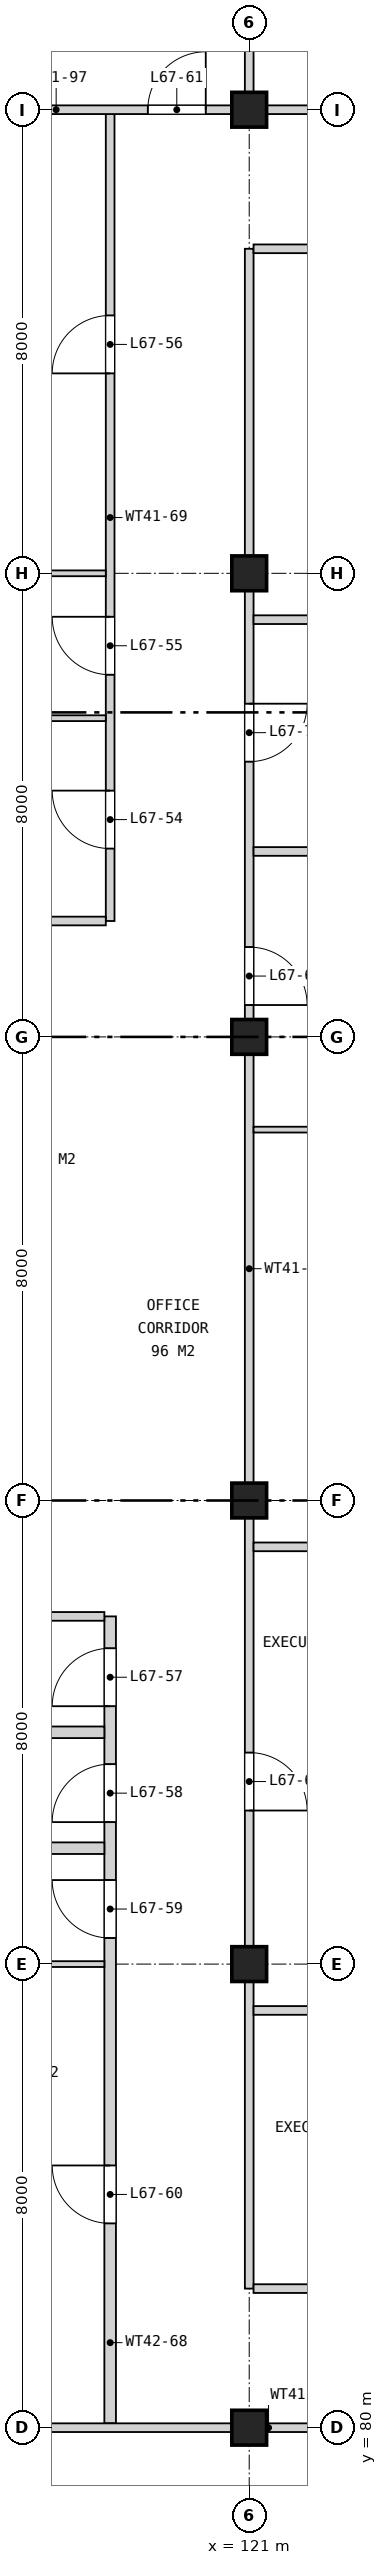
"""IFC4 building model, lengths in metres.
Left out: names, types, materials, properties, quantities, classifications, styles, units other than length and angle.
Written with IfcOpenShell. Run it as: python <this file> out.ifc"""

import sys

from ifc_helpers import new_model, si_unit, direction, frame, frame_2d, origin, origin_2d, place, context, subcontext, project, spatial, rectangle, extrude, element, fill, save


model = new_model("IFC4")
c1 = context("Model", 3, precision=1e-05, world=origin(), true_north=direction((0.0, 1.0)))
c2 = subcontext(c1, "Body", "Model", "MODEL_VIEW")
j1 = project(units=[si_unit("LENGTHUNIT", "METRE"), si_unit("PLANEANGLEUNIT", "RADIAN")], contexts=[c1])
p1 = place(None, origin())
s1 = spatial("IfcSite", under=j1, at=p1, CompositionType="ELEMENT")
p2 = place(p1, origin())
s2 = spatial("IfcBuilding", under=s1, at=p2, CompositionType="ELEMENT")
p3 = place(p2, frame((0.0, 0.0, 311.3)))
s3 = spatial("IfcBuildingStorey", under=s2, at=p3, CompositionType="ELEMENT", Elevation=311.3)
for number, where, z_axis, x_axis in (
    (1, (121.0, 80.0, 0.0), (0.0, 0.0, 1.0), (1.0, 0.0, 0.0)),
    (2, (121.0, 88.0, 0.0), (0.0, 0.0, 1.0), (1.0, 0.0, 0.0)),
    (3, (121.0, 96.0, 0.0), (0.0, 0.0, 1.0), (1.0, 0.0, 0.0)),
    (4, (121.0, 104.0, 0.0), (0.0, 0.0, 1.0), (1.0, 0.0, 0.0)),
    (5, (121.0, 112.0, 0.0), (0.0, 0.0, 1.0), (1.0, 0.0, 0.0)),
    (6, (121.0, 120.0, 0.0), (0.0, 0.0, 1.0), (1.0, 0.0, 0.0)),
):
    element("IfcColumn", number, at=place(p3, frame(where, z_axis=z_axis, x_axis=x_axis)), inside=s3, PredefinedType="COLUMN", context=c2, shape_type="SweptSolid", body=[
        extrude(rectangle(XDim=0.6, YDim=0.6, at=origin_2d()), origin(), (0.0, 0.0, 1.0), 4.2),
    ])
p4 = place(p3, frame((118.6, 80.075, 0.0), z_axis=(0.0, 0.0, 1.0), x_axis=(0.0, 1.0, 0.0)))
e7 = element("IfcWall", 7, at=p4, inside=s3, PredefinedType="SOLIDWALL", context=c2, shape_type="SweptSolid", body=[
    extrude(rectangle(XDim=13.925, YDim=0.2, at=frame_2d((6.962, 0.0))), origin(), (0.0, 0.0, 1.0), 3.443),
])
p5 = place(p4, frame((12.375, 0.0, 0.0)))
e8 = element("IfcOpeningElement", 8, at=p5, cuts=e7, PredefinedType="OPENING", context=c2, shape_type="SweptSolid", body=[
    extrude(rectangle(XDim=1.0, YDim=2.1, at=frame_2d((0.5, 1.05))), frame((0.0, 0.11, 0.0), z_axis=(0.0, -1.0, 0.0), x_axis=(1.0, 0.0, 0.0)), (0.0, 0.0, 1.0), 0.22),
])
p6 = place(p4, frame((10.375, 0.0, 0.0)))
e9 = element("IfcOpeningElement", 9, at=p6, cuts=e7, PredefinedType="OPENING", context=c2, shape_type="SweptSolid", body=[
    extrude(rectangle(XDim=1.0, YDim=2.1, at=frame_2d((0.5, 1.05))), frame((0.0, 0.11, 0.0), z_axis=(0.0, -1.0, 0.0), x_axis=(1.0, 0.0, 0.0)), (0.0, 0.0, 1.0), 0.22),
])
p7 = place(p4, frame((8.375, 0.0, 0.0)))
e10 = element("IfcOpeningElement", 10, at=p7, cuts=e7, PredefinedType="OPENING", context=c2, shape_type="SweptSolid", body=[
    extrude(rectangle(XDim=1.0, YDim=2.1, at=frame_2d((0.5, 1.05))), frame((0.0, 0.11, 0.0), z_axis=(0.0, -1.0, 0.0), x_axis=(1.0, 0.0, 0.0)), (0.0, 0.0, 1.0), 0.22),
])
p8 = place(p4, frame((3.45, 0.0, 0.0)))
e11 = element("IfcOpeningElement", 11, at=p8, cuts=e7, PredefinedType="OPENING", context=c2, shape_type="SweptSolid", body=[
    extrude(rectangle(XDim=1.0, YDim=2.1, at=frame_2d((0.5, 1.05))), frame((0.0, 0.11, 0.0), z_axis=(0.0, -1.0, 0.0), x_axis=(1.0, 0.0, 0.0)), (0.0, 0.0, 1.0), 0.22),
])
p9 = place(p3, frame((118.6, 106.0, 0.0), z_axis=(0.0, 0.0, 1.0), x_axis=(0.0, 1.0, 0.0)))
e12 = element("IfcWall", 12, at=p9, inside=s3, PredefinedType="PARTITIONING", context=c2, shape_type="SweptSolid", body=[
    extrude(rectangle(XDim=13.925, YDim=0.15, at=frame_2d((6.962, 0.0))), origin(), (0.0, 0.0, 1.0), 3.443),
])
p10 = place(p9, frame((1.25, 0.0, 0.0)))
e13 = element("IfcOpeningElement", 13, at=p10, cuts=e12, PredefinedType="OPENING", context=c2, shape_type="SweptSolid", body=[
    extrude(rectangle(XDim=1.0, YDim=2.1, at=frame_2d((0.5, 1.05))), frame((0.0, 0.085, 0.0), z_axis=(0.0, -1.0, 0.0), x_axis=(1.0, 0.0, 0.0)), (0.0, 0.0, 1.0), 0.17),
])
p11 = place(p9, frame((4.25, 0.0, 0.0)))
e14 = element("IfcOpeningElement", 14, at=p11, cuts=e12, PredefinedType="OPENING", context=c2, shape_type="SweptSolid", body=[
    extrude(rectangle(XDim=1.0, YDim=2.1, at=frame_2d((0.5, 1.05))), frame((0.0, 0.085, 0.0), z_axis=(0.0, -1.0, 0.0), x_axis=(1.0, 0.0, 0.0)), (0.0, 0.0, 1.0), 0.17),
])
p12 = place(p9, frame((9.45, 0.0, 0.0)))
e15 = element("IfcOpeningElement", 15, at=p12, cuts=e12, PredefinedType="OPENING", context=c2, shape_type="SweptSolid", body=[
    extrude(rectangle(XDim=1.0, YDim=2.1, at=frame_2d((0.5, 1.05))), frame((0.0, 0.085, 0.0), z_axis=(0.0, -1.0, 0.0), x_axis=(1.0, 0.0, 0.0)), (0.0, 0.0, 1.0), 0.17),
])
p13 = place(p3, frame((121.0, 82.4, 0.0), z_axis=(0.0, 0.0, 1.0), x_axis=(0.0, 1.0, 0.0)))
e16 = element("IfcWall", 16, at=p13, inside=s3, PredefinedType="PARTITIONING", context=c2, shape_type="SweptSolid", body=[
    extrude(rectangle(XDim=35.2, YDim=0.15, at=frame_2d((17.6, 0.0))), origin(), (0.0, 0.0, 1.0), 3.443),
])
p14 = place(p13, frame((8.25, 0.0, 0.0)))
e17 = element("IfcOpeningElement", 17, at=p14, cuts=e16, PredefinedType="OPENING", context=c2, shape_type="SweptSolid", body=[
    extrude(rectangle(XDim=1.0, YDim=2.1, at=frame_2d((0.5, 1.05))), frame((0.0, 0.085, 0.0), z_axis=(0.0, -1.0, 0.0), x_axis=(1.0, 0.0, 0.0)), (0.0, 0.0, 1.0), 0.17),
])
p15 = place(p13, frame((22.15, 0.0, 0.0)))
e18 = element("IfcOpeningElement", 18, at=p15, cuts=e16, PredefinedType="OPENING", context=c2, shape_type="SweptSolid", body=[
    extrude(rectangle(XDim=1.0, YDim=2.1, at=frame_2d((0.5, 1.05))), frame((0.0, 0.085, 0.0), z_axis=(0.0, -1.0, 0.0), x_axis=(1.0, 0.0, 0.0)), (0.0, 0.0, 1.0), 0.17),
])
p16 = place(p13, frame((26.35, 0.0, 0.0)))
e19 = element("IfcOpeningElement", 19, at=p16, cuts=e16, PredefinedType="OPENING", context=c2, shape_type="SweptSolid", body=[
    extrude(rectangle(XDim=1.0, YDim=2.1, at=frame_2d((0.5, 1.05))), frame((0.0, 0.085, 0.0), z_axis=(0.0, -1.0, 0.0), x_axis=(1.0, 0.0, 0.0)), (0.0, 0.0, 1.0), 0.17),
])
p17 = place(p3, frame((121.0, 120.075, 0.0), z_axis=(0.0, 0.0, 1.0), x_axis=(0.0, 1.0, 0.0)))
e20 = element("IfcWall", 20, at=p17, inside=s3, PredefinedType="PARTITIONING", context=c2, shape_type="SweptSolid", body=[
    extrude(rectangle(XDim=8.145, YDim=0.15, at=frame_2d((4.073, 0.0))), origin(), (0.0, 0.0, 1.0), 3.443),
])
p18 = place(p3, frame((112.78, 80.0, 0.0), z_axis=(0.0, 0.0, 1.0), x_axis=(1.0, 0.0, 0.0)))
e21 = element("IfcWall", 21, at=p18, inside=s3, PredefinedType="PARTITIONING", context=c2, shape_type="SweptSolid", body=[
    extrude(rectangle(XDim=24.44, YDim=0.15, at=frame_2d((12.22, 0.0))), origin(), (0.0, 0.0, 1.0), 3.443),
])
p19 = place(p18, frame((11.27, 0.0, 0.0)))
e22 = element("IfcOpeningElement", 22, at=p19, cuts=e21, PredefinedType="OPENING", context=c2, shape_type="SweptSolid", body=[
    extrude(rectangle(XDim=1.8, YDim=2.1, at=frame_2d((0.9, 1.05))), frame((0.0, 0.085, 0.0), z_axis=(0.0, -1.0, 0.0), x_axis=(1.0, 0.0, 0.0)), (0.0, 0.0, 1.0), 0.17),
])
p20 = place(p3, frame((121.075, 82.4, 0.0), z_axis=(0.0, 0.0, 1.0), x_axis=(1.0, 0.0, 0.0)))
e23 = element("IfcWall", 23, at=p20, inside=s3, PredefinedType="PARTITIONING", context=c2, shape_type="SweptSolid", body=[
    extrude(rectangle(XDim=7.85, YDim=0.15, at=frame_2d((3.925, 0.0))), origin(), (0.0, 0.0, 1.0), 3.443),
])
p21 = place(p20, frame((3.45, 0.0, 0.0)))
e24 = element("IfcOpeningElement", 24, at=p21, cuts=e23, PredefinedType="OPENING", context=c2, shape_type="SweptSolid", body=[
    extrude(rectangle(XDim=1.0, YDim=2.1, at=frame_2d((0.5, 1.05))), frame((0.0, 0.085, 0.0), z_axis=(0.0, -1.0, 0.0), x_axis=(1.0, 0.0, 0.0)), (0.0, 0.0, 1.0), 0.17),
])
p22 = place(p3, frame((121.075, 87.2, 0.0), z_axis=(0.0, 0.0, 1.0), x_axis=(1.0, 0.0, 0.0)))
e25 = element("IfcWall", 25, at=p22, inside=s3, PredefinedType="PARTITIONING", context=c2, shape_type="SweptSolid", body=[
    extrude(rectangle(XDim=7.85, YDim=0.15, at=frame_2d((3.925, 0.0))), origin(), (0.0, 0.0, 1.0), 3.443),
])
p23 = place(p3, frame((113.0, 88.0, 0.0), z_axis=(0.0, 0.0, 1.0), x_axis=(1.0, 0.0, 0.0)))
e26 = element("IfcWall", 26, at=p23, inside=s3, PredefinedType="PARTITIONING", context=c2, shape_type="SweptSolid", body=[
    extrude(rectangle(XDim=5.5, YDim=0.1, at=frame_2d((2.75, 0.0))), origin(), (0.0, 0.0, 1.0), 3.443),
])
for number, where, z_axis, x_axis in (
    (27, (113.0, 90.0, 0.0), (0.0, 0.0, 1.0), (1.0, 0.0, 0.0)),
    (28, (113.0, 92.0, 0.0), (0.0, 0.0, 1.0), (1.0, 0.0, 0.0)),
):
    element("IfcWall", number, at=place(p3, frame(where, z_axis=z_axis, x_axis=x_axis)), inside=s3, PredefinedType="SOLIDWALL", context=c2, shape_type="SweptSolid", body=[
        extrude(rectangle(XDim=5.5, YDim=0.2, at=frame_2d((2.75, 0.0))), origin(), (0.0, 0.0, 1.0), 3.443),
    ])
p24 = place(p3, frame((113.0, 94.0, 0.0), z_axis=(0.0, 0.0, 1.0), x_axis=(1.0, 0.0, 0.0)))
e29 = element("IfcWall", 29, at=p24, inside=s3, PredefinedType="PARTITIONING", context=c2, shape_type="SweptSolid", body=[
    extrude(rectangle(XDim=5.5, YDim=0.15, at=frame_2d((2.75, 0.0))), origin(), (0.0, 0.0, 1.0), 3.443),
])
p25 = place(p3, frame((121.075, 95.2, 0.0), z_axis=(0.0, 0.0, 1.0), x_axis=(1.0, 0.0, 0.0)))
e30 = element("IfcWall", 30, at=p25, inside=s3, PredefinedType="PARTITIONING", context=c2, shape_type="SweptSolid", body=[
    extrude(rectangle(XDim=7.85, YDim=0.15, at=frame_2d((3.925, 0.0))), origin(), (0.0, 0.0, 1.0), 3.443),
])
p26 = place(p3, frame((121.075, 102.4, 0.0), z_axis=(0.0, 0.0, 1.0), x_axis=(1.0, 0.0, 0.0)))
e31 = element("IfcWall", 31, at=p26, inside=s3, PredefinedType="PARTITIONING", context=c2, shape_type="SweptSolid", body=[
    extrude(rectangle(XDim=7.85, YDim=0.1, at=frame_2d((3.925, 0.0))), origin(), (0.0, 0.0, 1.0), 3.443),
])
p27 = place(p3, frame((113.0, 106.0, 0.0), z_axis=(0.0, 0.0, 1.0), x_axis=(1.0, 0.0, 0.0)))
e32 = element("IfcWall", 32, at=p27, inside=s3, PredefinedType="PARTITIONING", context=c2, shape_type="SweptSolid", body=[
    extrude(rectangle(XDim=5.525, YDim=0.15, at=frame_2d((2.762, 0.0))), origin(), (0.0, 0.0, 1.0), 3.443),
])
p28 = place(p3, frame((121.075, 107.2, 0.0), z_axis=(0.0, 0.0, 1.0), x_axis=(1.0, 0.0, 0.0)))
e33 = element("IfcWall", 33, at=p28, inside=s3, PredefinedType="PARTITIONING", context=c2, shape_type="SweptSolid", body=[
    extrude(rectangle(XDim=7.85, YDim=0.15, at=frame_2d((3.925, 0.0))), origin(), (0.0, 0.0, 1.0), 3.443),
])
p29 = place(p3, frame((113.0, 109.5, 0.0), z_axis=(0.0, 0.0, 1.0), x_axis=(1.0, 0.0, 0.0)))
e34 = element("IfcWall", 34, at=p29, inside=s3, PredefinedType="PARTITIONING", context=c2, shape_type="SweptSolid", body=[
    extrude(rectangle(XDim=5.525, YDim=0.1, at=frame_2d((2.762, 0.0))), origin(), (0.0, 0.0, 1.0), 3.443),
])
p30 = place(p3, frame((121.075, 111.2, 0.0), z_axis=(0.0, 0.0, 1.0), x_axis=(1.0, 0.0, 0.0)))
e35 = element("IfcWall", 35, at=p30, inside=s3, PredefinedType="PARTITIONING", context=c2, shape_type="SweptSolid", body=[
    extrude(rectangle(XDim=7.85, YDim=0.15, at=frame_2d((3.925, 0.0))), origin(), (0.0, 0.0, 1.0), 3.443),
])
p31 = place(p3, frame((113.0, 112.0, 0.0), z_axis=(0.0, 0.0, 1.0), x_axis=(1.0, 0.0, 0.0)))
e36 = element("IfcWall", 36, at=p31, inside=s3, PredefinedType="PARTITIONING", context=c2, shape_type="SweptSolid", body=[
    extrude(rectangle(XDim=5.525, YDim=0.1, at=frame_2d((2.762, 0.0))), origin(), (0.0, 0.0, 1.0), 3.443),
])
p32 = place(p3, frame((121.075, 117.6, 0.0), z_axis=(0.0, 0.0, 1.0), x_axis=(1.0, 0.0, 0.0)))
e37 = element("IfcWall", 37, at=p32, inside=s3, PredefinedType="PARTITIONING", context=c2, shape_type="SweptSolid", body=[
    extrude(rectangle(XDim=7.85, YDim=0.15, at=frame_2d((3.925, 0.0))), origin(), (0.0, 0.0, 1.0), 3.443),
])
p33 = place(p32, frame((3.45, 0.0, 0.0)))
e38 = element("IfcOpeningElement", 38, at=p33, cuts=e37, PredefinedType="OPENING", context=c2, shape_type="SweptSolid", body=[
    extrude(rectangle(XDim=1.0, YDim=2.1, at=frame_2d((0.5, 1.05))), frame((0.0, 0.085, 0.0), z_axis=(0.0, -1.0, 0.0), x_axis=(1.0, 0.0, 0.0)), (0.0, 0.0, 1.0), 0.17),
])
p34 = place(p3, frame((112.78, 120.0, 0.0), z_axis=(0.0, 0.0, 1.0), x_axis=(1.0, 0.0, 0.0)))
e39 = element("IfcWall", 39, at=p34, inside=s3, PredefinedType="PARTITIONING", context=c2, shape_type="SweptSolid", body=[
    extrude(rectangle(XDim=24.44, YDim=0.15, at=frame_2d((12.22, 0.0))), origin(), (0.0, 0.0, 1.0), 3.443),
])
p35 = place(p34, frame((6.47, 0.0, 0.0)))
e40 = element("IfcOpeningElement", 40, at=p35, cuts=e39, PredefinedType="OPENING", context=c2, shape_type="SweptSolid", body=[
    extrude(rectangle(XDim=1.0, YDim=2.1, at=frame_2d((0.5, 1.05))), frame((0.0, 0.085, 0.0), z_axis=(0.0, -1.0, 0.0), x_axis=(1.0, 0.0, 0.0)), (0.0, 0.0, 1.0), 0.17),
])
p36 = place(p34, frame((11.67, 0.0, 0.0)))
e41 = element("IfcOpeningElement", 41, at=p36, cuts=e39, PredefinedType="OPENING", context=c2, shape_type="SweptSolid", body=[
    extrude(rectangle(XDim=1.0, YDim=2.1, at=frame_2d((0.5, 1.05))), frame((0.0, 0.085, 0.0), z_axis=(0.0, -1.0, 0.0), x_axis=(1.0, 0.0, 0.0)), (0.0, 0.0, 1.0), 0.17),
])
p37 = place(p34, frame((16.97, 0.0, 0.0)))
e42 = element("IfcOpeningElement", 42, at=p37, cuts=e39, PredefinedType="OPENING", context=c2, shape_type="SweptSolid", body=[
    extrude(rectangle(XDim=1.0, YDim=2.1, at=frame_2d((0.5, 1.05))), frame((0.0, 0.085, 0.0), z_axis=(0.0, -1.0, 0.0), x_axis=(1.0, 0.0, 0.0)), (0.0, 0.0, 1.0), 0.17),
])
p38 = place(p10, origin())
e43 = element("IfcDoor", 43, at=p38, inside=s3, OperationType="SINGLE_SWING_RIGHT", PredefinedType="DOOR", context=c2, shape_type="SweptSolid", body=[
    extrude(rectangle(XDim=1.0, YDim=2.1, at=frame_2d((0.5, 1.05))), frame((0.0, 0.025, 0.0), z_axis=(0.0, -1.0, 0.0), x_axis=(1.0, 0.0, 0.0)), (0.0, 0.0, 1.0), 0.05),
])
fill(e13, e43)
p39 = place(p11, origin())
e44 = element("IfcDoor", 44, at=p39, inside=s3, OperationType="SINGLE_SWING_RIGHT", PredefinedType="DOOR", context=c2, shape_type="SweptSolid", body=[
    extrude(rectangle(XDim=1.0, YDim=2.1, at=frame_2d((0.5, 1.05))), frame((0.0, 0.025, 0.0), z_axis=(0.0, -1.0, 0.0), x_axis=(1.0, 0.0, 0.0)), (0.0, 0.0, 1.0), 0.05),
])
fill(e14, e44)
p40 = place(p12, origin())
e45 = element("IfcDoor", 45, at=p40, inside=s3, OperationType="SINGLE_SWING_LEFT", PredefinedType="DOOR", context=c2, shape_type="SweptSolid", body=[
    extrude(rectangle(XDim=1.0, YDim=2.1, at=frame_2d((0.5, 1.05))), frame((0.0, 0.025, 0.0), z_axis=(0.0, -1.0, 0.0), x_axis=(1.0, 0.0, 0.0)), (0.0, 0.0, 1.0), 0.05),
])
fill(e15, e45)
p41 = place(p5, origin())
e46 = element("IfcDoor", 46, at=p41, inside=s3, OperationType="SINGLE_SWING_LEFT", PredefinedType="DOOR", context=c2, shape_type="SweptSolid", body=[
    extrude(rectangle(XDim=1.0, YDim=2.1, at=frame_2d((0.5, 1.05))), frame((0.0, 0.025, 0.0), z_axis=(0.0, -1.0, 0.0), x_axis=(1.0, 0.0, 0.0)), (0.0, 0.0, 1.0), 0.05),
])
fill(e8, e46)
p42 = place(p6, origin())
e47 = element("IfcDoor", 47, at=p42, inside=s3, OperationType="SINGLE_SWING_LEFT", PredefinedType="DOOR", context=c2, shape_type="SweptSolid", body=[
    extrude(rectangle(XDim=1.0, YDim=2.1, at=frame_2d((0.5, 1.05))), frame((0.0, 0.025, 0.0), z_axis=(0.0, -1.0, 0.0), x_axis=(1.0, 0.0, 0.0)), (0.0, 0.0, 1.0), 0.05),
])
fill(e9, e47)
p43 = place(p7, origin())
e48 = element("IfcDoor", 48, at=p43, inside=s3, OperationType="SINGLE_SWING_RIGHT", PredefinedType="DOOR", context=c2, shape_type="SweptSolid", body=[
    extrude(rectangle(XDim=1.0, YDim=2.1, at=frame_2d((0.5, 1.05))), frame((0.0, 0.025, 0.0), z_axis=(0.0, -1.0, 0.0), x_axis=(1.0, 0.0, 0.0)), (0.0, 0.0, 1.0), 0.05),
])
fill(e10, e48)
p44 = place(p8, origin())
e49 = element("IfcDoor", 49, at=p44, inside=s3, OperationType="SINGLE_SWING_RIGHT", PredefinedType="DOOR", context=c2, shape_type="SweptSolid", body=[
    extrude(rectangle(XDim=1.0, YDim=2.1, at=frame_2d((0.5, 1.05))), frame((0.0, 0.025, 0.0), z_axis=(0.0, -1.0, 0.0), x_axis=(1.0, 0.0, 0.0)), (0.0, 0.0, 1.0), 0.05),
])
fill(e11, e49)
p45 = place(p35, origin())
e50 = element("IfcDoor", 50, at=p45, inside=s3, OperationType="SINGLE_SWING_RIGHT", PredefinedType="DOOR", context=c2, shape_type="SweptSolid", body=[
    extrude(rectangle(XDim=1.0, YDim=2.1, at=frame_2d((0.5, 1.05))), frame((0.0, 0.025, 0.0), z_axis=(0.0, -1.0, 0.0), x_axis=(1.0, 0.0, 0.0)), (0.0, 0.0, 1.0), 0.05),
])
fill(e40, e50)
p46 = place(p14, frame((1.0, 0.0, 0.0), z_axis=(0.0, 0.0, 1.0), x_axis=(-1.0, 0.0, 0.0)))
e51 = element("IfcDoor", 51, at=p46, inside=s3, OperationType="SINGLE_SWING_RIGHT", PredefinedType="DOOR", context=c2, shape_type="SweptSolid", body=[
    extrude(rectangle(XDim=1.0, YDim=2.1, at=frame_2d((0.5, 1.05))), frame((0.0, 0.025, 0.0), z_axis=(0.0, -1.0, 0.0), x_axis=(1.0, 0.0, 0.0)), (0.0, 0.0, 1.0), 0.05),
])
fill(e17, e51)
p47 = place(p15, frame((1.0, 0.0, 0.0), z_axis=(0.0, 0.0, 1.0), x_axis=(-1.0, 0.0, 0.0)))
e52 = element("IfcDoor", 52, at=p47, inside=s3, OperationType="SINGLE_SWING_RIGHT", PredefinedType="DOOR", context=c2, shape_type="SweptSolid", body=[
    extrude(rectangle(XDim=1.0, YDim=2.1, at=frame_2d((0.5, 1.05))), frame((0.0, 0.025, 0.0), z_axis=(0.0, -1.0, 0.0), x_axis=(1.0, 0.0, 0.0)), (0.0, 0.0, 1.0), 0.05),
])
fill(e18, e52)
p48 = place(p16, frame((1.0, 0.0, 0.0), z_axis=(0.0, 0.0, 1.0), x_axis=(-1.0, 0.0, 0.0)))
e53 = element("IfcDoor", 53, at=p48, inside=s3, OperationType="SINGLE_SWING_LEFT", PredefinedType="DOOR", context=c2, shape_type="SweptSolid", body=[
    extrude(rectangle(XDim=1.0, YDim=2.1, at=frame_2d((0.5, 1.05))), frame((0.0, 0.025, 0.0), z_axis=(0.0, -1.0, 0.0), x_axis=(1.0, 0.0, 0.0)), (0.0, 0.0, 1.0), 0.05),
])
fill(e19, e53)
save(model, sys.argv[1])
